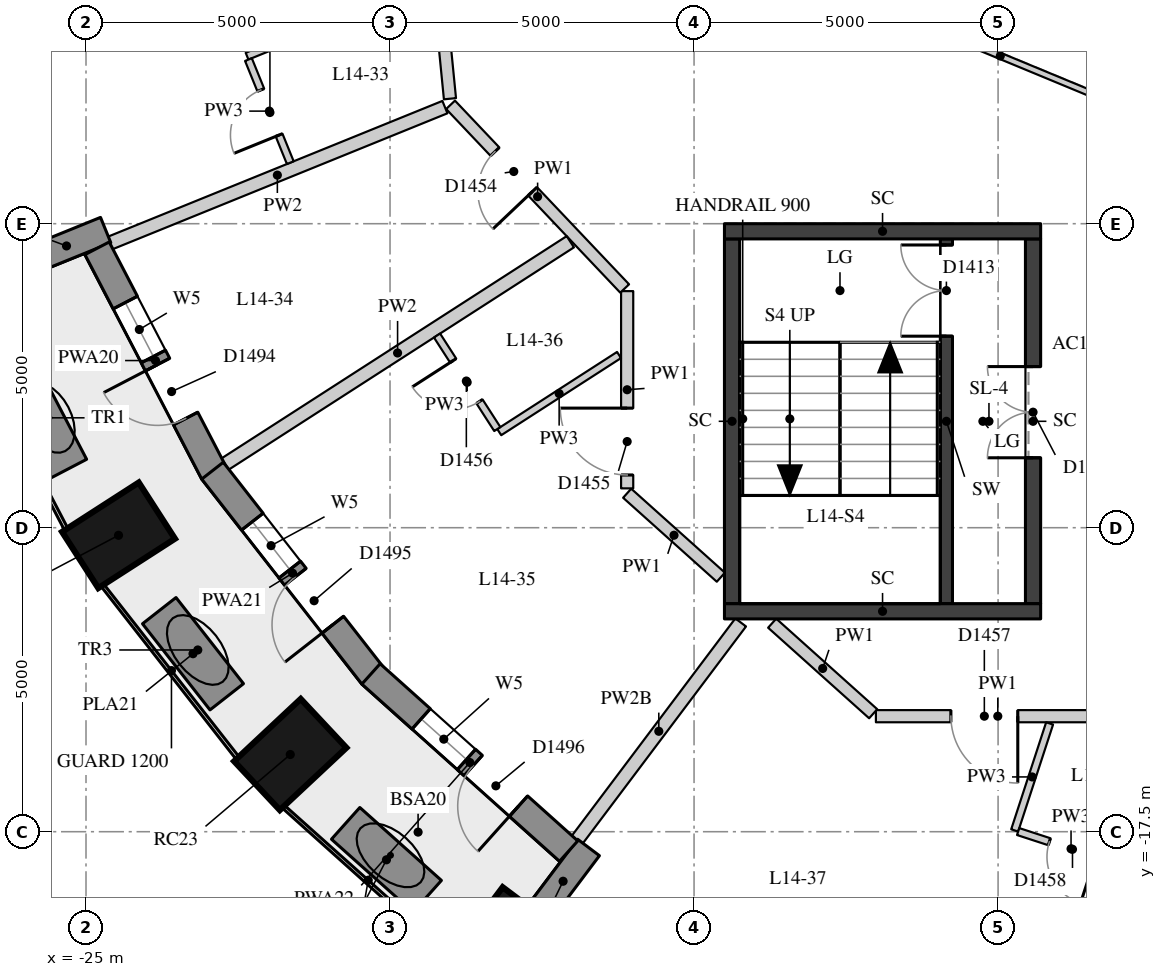
"""IFC4 building model, lengths in metres.
Left out: names, types, materials, properties, quantities, classifications, styles, units other than length and angle.
Written with IfcOpenShell. Run it as: python <this file> out.ifc"""

import sys

from ifc_helpers import new_model, si_unit, direction, frame, frame_2d, origin, origin_2d, place, context, subcontext, project, spatial, rectangle, extrude, element, fill, save


model = new_model("IFC4")
c1 = context("Model", 3, precision=1e-05, world=origin(), true_north=direction((0.0, 1.0)))
c2 = subcontext(c1, "Body", "Model", "MODEL_VIEW")
j1 = project(units=[si_unit("LENGTHUNIT", "METRE"), si_unit("PLANEANGLEUNIT", "RADIAN")], contexts=[c1])
p1 = place(None, origin())
s1 = spatial("IfcSite", under=j1, at=p1, CompositionType="ELEMENT")
p2 = place(p1, origin())
s2 = spatial("IfcBuilding", under=s1, at=p2, CompositionType="ELEMENT")
p3 = place(p2, frame((0.0, 0.0, 54.7)))
s3 = spatial("IfcBuildingStorey", under=s2, at=p3, CompositionType="ELEMENT", Elevation=54.7)
for number, where, z_axis, x_axis in (
    (1, (-24.465, -12.625, 0.0), (0.0, 0.0, 1.0), (-0.841, -0.541, 0.0)),
    (2, (-21.641, -16.23, 0.0), (0.0, 0.0, 1.0), (-0.73, -0.683, 0.0)),
    (3, (-18.159, -19.343, 0.0), (0.0, 0.0, 1.0), (-0.601, -0.799, 0.0)),
):
    element("IfcColumn", number, at=place(p3, frame(where, z_axis=z_axis, x_axis=x_axis)), inside=s3, PredefinedType="COLUMN", context=c2, shape_type="SweptSolid", body=[
        extrude(rectangle(XDim=1.5, YDim=1.1, at=origin_2d()), origin(), (0.0, 0.0, 1.0), 3.3),
    ])
p4 = place(p3, frame((-25.965, -8.127, 0.0), z_axis=(0.0, 0.0, 1.0), x_axis=(0.926575599743, 0.376108572039, 0.0)))
e4 = element("IfcWall", 4, at=p4, inside=s3, PredefinedType="SOLIDWALL", context=c2, shape_type="SweptSolid", body=[
    extrude(rectangle(XDim=1.39, YDim=0.45, at=frame_2d((0.695, 0.0))), origin(), (0.0, 0.0, 1.0), 3.02),
])
p5 = place(p3, frame((-17.572, -18.871, 0.0), z_axis=(0.0, 0.0, 1.0), x_axis=(0.601262851241, 0.799051302306, 0.0)))
e5 = element("IfcWall", 5, at=p5, inside=s3, PredefinedType="SOLIDWALL", context=c2, shape_type="SweptSolid", body=[
    extrude(rectangle(XDim=1.391, YDim=0.45, at=frame_2d((0.696, 0.0))), origin(), (0.0, 0.0, 1.0), 2.57),
])
p6 = place(p3, frame((-24.818, -7.905, 0.0), z_axis=(0.0, 0.0, 1.0), x_axis=(0.461517123562, -0.887131300687, 0.0)))
e6 = element("IfcWall", 6, at=p6, inside=s3, PredefinedType="SOLIDWALL", context=c2, shape_type="SweptSolid", body=[
    extrude(rectangle(XDim=4.162, YDim=0.45, at=frame_2d((2.081, 0.0))), origin(), (0.0, 0.0, 1.0), 3.02),
])
p7 = place(p6, frame((1.006, 0.0, 0.4)))
e7 = element("IfcOpeningElement", 7, at=p7, cuts=e6, PredefinedType="OPENING", context=c2, shape_type="SweptSolid", body=[
    extrude(rectangle(XDim=1.0, YDim=1.75, at=frame_2d((0.5, 0.875))), frame((0.0, 0.235, 0.0), z_axis=(0.0, -1.0, 0.0), x_axis=(1.0, 0.0, 0.0)), (0.0, 0.0, 1.0), 0.47),
])
p8 = place(p6, frame((2.156, 0.0, 0.0)))
e8 = element("IfcOpeningElement", 8, at=p8, cuts=e6, PredefinedType="OPENING", context=c2, shape_type="SweptSolid", body=[
    extrude(rectangle(XDim=1.0, YDim=2.15, at=frame_2d((0.5, 1.075))), frame((0.0, 0.235, 0.0), z_axis=(0.0, -1.0, 0.0), x_axis=(1.0, 0.0, 0.0)), (0.0, 0.0, 1.0), 0.47),
])
p9 = place(p3, frame((-22.92, -11.562, 0.0), z_axis=(0.0, 0.0, 1.0), x_axis=(0.615586464456, -0.788069352772, 0.0)))
e9 = element("IfcWall", 9, at=p9, inside=s3, PredefinedType="SOLIDWALL", context=c2, shape_type="SweptSolid", body=[
    extrude(rectangle(XDim=4.279, YDim=0.45, at=frame_2d((2.139, 0.0))), origin(), (0.0, 0.0, 1.0), 3.02),
])
p10 = place(p9, frame((1.064, 0.0, 0.4)))
e10 = element("IfcOpeningElement", 10, at=p10, cuts=e9, PredefinedType="OPENING", context=c2, shape_type="SweptSolid", body=[
    extrude(rectangle(XDim=1.0, YDim=1.75, at=frame_2d((0.5, 0.875))), frame((0.0, 0.235, 0.0), z_axis=(0.0, -1.0, 0.0), x_axis=(1.0, 0.0, 0.0)), (0.0, 0.0, 1.0), 0.47),
])
p11 = place(p9, frame((2.214, 0.0, 0.0)))
e11 = element("IfcOpeningElement", 11, at=p11, cuts=e9, PredefinedType="OPENING", context=c2, shape_type="SweptSolid", body=[
    extrude(rectangle(XDim=1.0, YDim=2.15, at=frame_2d((0.5, 1.075))), frame((0.0, 0.235, 0.0), z_axis=(0.0, -1.0, 0.0), x_axis=(1.0, 0.0, 0.0)), (0.0, 0.0, 1.0), 0.47),
])
p12 = place(p3, frame((-20.313, -14.905, 0.0), z_axis=(0.0, 0.0, 1.0), x_axis=(0.744616407434, -0.667492626012, 0.0)))
e12 = element("IfcWall", 12, at=p12, inside=s3, PredefinedType="SOLIDWALL", context=c2, shape_type="SweptSolid", body=[
    extrude(rectangle(XDim=4.365, YDim=0.45, at=frame_2d((2.183, 0.0))), origin(), (0.0, 0.0, 1.0), 3.02),
])
p13 = place(p12, frame((1.108, 0.0, 0.4)))
e13 = element("IfcOpeningElement", 13, at=p13, cuts=e12, PredefinedType="OPENING", context=c2, shape_type="SweptSolid", body=[
    extrude(rectangle(XDim=1.0, YDim=1.75, at=frame_2d((0.5, 0.875))), frame((0.0, 0.235, 0.0), z_axis=(0.0, -1.0, 0.0), x_axis=(1.0, 0.0, 0.0)), (0.0, 0.0, 1.0), 0.47),
])
p14 = place(p12, frame((2.258, 0.0, 0.0)))
e14 = element("IfcOpeningElement", 14, at=p14, cuts=e12, PredefinedType="OPENING", context=c2, shape_type="SweptSolid", body=[
    extrude(rectangle(XDim=1.0, YDim=2.15, at=frame_2d((0.5, 1.075))), frame((0.0, 0.235, 0.0), z_axis=(0.0, -1.0, 0.0), x_axis=(1.0, 0.0, 0.0)), (0.0, 0.0, 1.0), 0.47),
])
p15 = place(p3, frame((-26.133, -9.941, 0.0), z_axis=(0.0, 0.0, 1.0), x_axis=(0.462501112253, -0.886618701114, 0.0)))
e15 = element("IfcWall", 15, at=p15, inside=s3, PredefinedType="USERDEFINED", context=c2, shape_type="SweptSolid", body=[
    extrude(rectangle(XDim=1.8, YDim=0.7, at=frame_2d((0.9, 0.0))), origin(), (0.0, 0.0, 1.0), 0.75),
])
p16 = place(p3, frame((-23.795, -13.864, 0.0), z_axis=(0.0, 0.0, 1.0), x_axis=(0.616622746332, -0.787258781282, 0.0)))
e16 = element("IfcWall", 16, at=p16, inside=s3, PredefinedType="USERDEFINED", context=c2, shape_type="SweptSolid", body=[
    extrude(rectangle(XDim=1.8, YDim=0.7, at=frame_2d((0.9, 0.0))), origin(), (0.0, 0.0, 1.0), 0.75),
])
p17 = place(p3, frame((-20.73, -17.363, 0.0), z_axis=(0.0, 0.0, 1.0), x_axis=(0.745535653445, -0.666465745139, 0.0)))
e17 = element("IfcWall", 17, at=p17, inside=s3, PredefinedType="USERDEFINED", context=c2, shape_type="SweptSolid", body=[
    extrude(rectangle(XDim=1.8, YDim=0.7, at=frame_2d((0.9, 0.0))), origin(), (0.0, 0.0, 1.0), 0.75),
])
p18 = place(p3, frame((-10.85, -13.75, 0.0), z_axis=(0.0, 0.0, 1.0), x_axis=(0.0, 1.0, 0.0)))
e18 = element("IfcWall", 18, at=p18, inside=s3, PredefinedType="SHEAR", context=c2, shape_type="SweptSolid", body=[
    extrude(rectangle(XDim=6.0, YDim=0.2, at=frame_2d((3.0, 0.0))), origin(), (0.0, 0.0, 1.0), 3.02),
])
p19 = place(p18, frame((4.4, 0.0, 0.0)))
e19 = element("IfcOpeningElement", 19, at=p19, cuts=e18, PredefinedType="OPENING", context=c2, shape_type="SweptSolid", body=[
    extrude(rectangle(XDim=1.5, YDim=2.1, at=frame_2d((0.75, 1.05))), frame((0.0, 0.11, 0.0), z_axis=(0.0, -1.0, 0.0), x_axis=(1.0, 0.0, 0.0)), (0.0, 0.0, 1.0), 0.22),
])
p20 = place(p3, frame((-14.375, -13.75, -0.28), z_axis=(0.0, 0.0, 1.0), x_axis=(0.0, 1.0, 0.0)))
e20 = element("IfcWall", 20, at=p20, inside=s3, PredefinedType="SHEAR", context=c2, shape_type="SweptSolid", body=[
    extrude(rectangle(XDim=6.0, YDim=0.25, at=frame_2d((3.0, 0.0))), origin(), (0.0, 0.0, 1.0), 3.3),
])
p21 = place(p3, frame((-9.425, -13.75, -0.28), z_axis=(0.0, 0.0, 1.0), x_axis=(0.0, 1.0, 0.0)))
e21 = element("IfcWall", 21, at=p21, inside=s3, PredefinedType="SHEAR", context=c2, shape_type="SweptSolid", body=[
    extrude(rectangle(XDim=6.0, YDim=0.25, at=frame_2d((3.0, 0.0))), origin(), (0.0, 0.0, 1.0), 3.3),
])
p22 = place(p21, frame((2.4, 0.0, 0.28)))
e22 = element("IfcOpeningElement", 22, at=p22, cuts=e21, PredefinedType="OPENING", context=c2, shape_type="SweptSolid", body=[
    extrude(rectangle(XDim=1.5, YDim=2.1, at=frame_2d((0.75, 1.05))), frame((0.0, 0.135, 0.0), z_axis=(0.0, -1.0, 0.0), x_axis=(1.0, 0.0, 0.0)), (0.0, 0.0, 1.0), 0.27),
])
for number, where, z_axis, x_axis in (
    (23, (-14.5, -7.625, -0.28), (0.0, 0.0, 1.0), (1.0, 0.0, 0.0)),
    (24, (-14.5, -13.875, -0.28), (0.0, 0.0, 1.0), (1.0, 0.0, 0.0)),
):
    element("IfcWall", number, at=place(p3, frame(where, z_axis=z_axis, x_axis=x_axis)), inside=s3, PredefinedType="SHEAR", context=c2, shape_type="SweptSolid", body=[
        extrude(rectangle(XDim=5.2, YDim=0.25, at=frame_2d((2.6, 0.0))), origin(), (0.0, 0.0, 1.0), 3.3),
    ])
p23 = place(p3, frame((-14.559, -13.314, 0.0), z_axis=(0.0, 0.0, 1.0), x_axis=(-0.744636171002, 0.667470578254, 0.0)))
e25 = element("IfcWall", 25, at=p23, inside=s3, PredefinedType="PARTITIONING", context=c2, shape_type="SweptSolid", body=[
    extrude(rectangle(XDim=2.069, YDim=0.2, at=frame_2d((1.035, 0.0))), origin(), (0.0, 0.0, 1.0), 3.02),
])
p24 = place(p3, frame((-16.1, -11.853, 0.0), z_axis=(0.0, 0.0, 1.0), x_axis=(0.0, 1.0, 0.0)))
e26 = element("IfcWall", 26, at=p24, inside=s3, PredefinedType="PARTITIONING", context=c2, shape_type="SweptSolid", body=[
    extrude(rectangle(XDim=3.244, YDim=0.2, at=frame_2d((1.622, 0.0))), origin(), (0.0, 0.0, 1.0), 3.02),
])
p25 = place(p24, frame((0.22, 0.0, 0.0)))
e27 = element("IfcOpeningElement", 27, at=p25, cuts=e26, PredefinedType="OPENING", context=c2, shape_type="SweptSolid", body=[
    extrude(rectangle(XDim=1.1, YDim=2.1, at=frame_2d((0.55, 1.05))), frame((0.0, 0.11, 0.0), z_axis=(0.0, -1.0, 0.0), x_axis=(1.0, 0.0, 0.0)), (0.0, 0.0, 1.0), 0.22),
])
p26 = place(p3, frame((-16.141, -8.566, 0.0), z_axis=(0.0, 0.0, 1.0), x_axis=(-0.687938220375, 0.725769250483, 0.0)))
e28 = element("IfcWall", 28, at=p26, inside=s3, PredefinedType="PARTITIONING", context=c2, shape_type="SweptSolid", body=[
    extrude(rectangle(XDim=4.162, YDim=0.2, at=frame_2d((2.081, 0.0))), origin(), (0.0, 0.0, 1.0), 3.02),
])
p27 = place(p26, frame((2.201, 0.0, 0.0)))
e29 = element("IfcOpeningElement", 29, at=p27, cuts=e28, PredefinedType="OPENING", context=c2, shape_type="SweptSolid", body=[
    extrude(rectangle(XDim=0.9, YDim=2.1, at=frame_2d((0.45, 1.05))), frame((0.0, 0.11, 0.0), z_axis=(0.0, -1.0, 0.0), x_axis=(1.0, 0.0, 0.0)), (0.0, 0.0, 1.0), 0.22),
])
p28 = place(p3, frame((-19.014, -5.445, 0.0), z_axis=(0.0, 0.0, 1.0), x_axis=(-0.098076369896, 0.995178891289, 0.0)))
e30 = element("IfcWall", 30, at=p28, inside=s3, PredefinedType="PARTITIONING", context=c2, shape_type="SweptSolid", body=[
    extrude(rectangle(XDim=8.282, YDim=0.2, at=frame_2d((4.141, 0.0))), origin(), (0.0, 0.0, 1.0), 3.02),
])
p29 = place(p28, frame((2.142, 0.0, 0.0)))
e31 = element("IfcOpeningElement", 31, at=p29, cuts=e30, PredefinedType="OPENING", context=c2, shape_type="SweptSolid", body=[
    extrude(rectangle(XDim=1.1, YDim=2.1, at=frame_2d((0.55, 1.05))), frame((0.0, 0.11, 0.0), z_axis=(0.0, -1.0, 0.0), x_axis=(1.0, 0.0, 0.0)), (0.0, 0.0, 1.0), 0.22),
])
p30 = place(p3, frame((-8.0, -15.6, 0.0), z_axis=(0.0, 0.0, 1.0), x_axis=(-1.0, 0.0, 0.0)))
e32 = element("IfcWall", 32, at=p30, inside=s3, PredefinedType="PARTITIONING", context=c2, shape_type="SweptSolid", body=[
    extrude(rectangle(XDim=4.009, YDim=0.2, at=frame_2d((2.005, 0.0))), origin(), (0.0, 0.0, 1.0), 3.02),
])
p31 = place(p30, frame((1.676, 0.0, 0.0)))
e33 = element("IfcOpeningElement", 33, at=p31, cuts=e32, PredefinedType="OPENING", context=c2, shape_type="SweptSolid", body=[
    extrude(rectangle(XDim=1.1, YDim=2.1, at=frame_2d((0.55, 1.05))), frame((0.0, 0.11, 0.0), z_axis=(0.0, -1.0, 0.0), x_axis=(1.0, 0.0, 0.0)), (0.0, 0.0, 1.0), 0.22),
])
p32 = place(p3, frame((-12.054, -15.56, 0.0), z_axis=(0.0, 0.0, 1.0), x_axis=(-0.744625700487, 0.66748225907, 0.0)))
e34 = element("IfcWall", 34, at=p32, inside=s3, PredefinedType="PARTITIONING", context=c2, shape_type="SweptSolid", body=[
    extrude(rectangle(XDim=2.231, YDim=0.2, at=frame_2d((1.116, 0.0))), origin(), (0.0, 0.0, 1.0), 3.02),
])
p33 = place(p3, frame((-24.609, -7.82, 0.0), z_axis=(0.0, 0.0, 1.0), x_axis=(0.926562262773, 0.376141427131, 0.0)))
e35 = element("IfcWall", 35, at=p33, inside=s3, PredefinedType="PARTITIONING", context=c2, shape_type="SweptSolid", body=[
    extrude(rectangle(XDim=5.948, YDim=0.22, at=frame_2d((2.974, 0.0))), origin(), (0.0, 0.0, 1.0), 3.02),
])
p34 = place(p3, frame((-22.717, -11.456, 0.0), z_axis=(0.0, 0.0, 1.0), x_axis=(0.840775666807, 0.541383669965, 0.0)))
e36 = element("IfcWall", 36, at=p34, inside=s3, PredefinedType="PARTITIONING", context=c2, shape_type="SweptSolid", body=[
    extrude(rectangle(XDim=6.759, YDim=0.22, at=frame_2d((3.379, 0.0))), origin(), (0.0, 0.0, 1.0), 3.02),
])
p35 = place(p3, frame((-16.927, -17.638, 0.0), z_axis=(0.0, 0.0, 1.0), x_axis=(0.601158965663, 0.799129462605, 0.0)))
e37 = element("IfcWall", 37, at=p35, inside=s3, PredefinedType="PARTITIONING", context=c2, shape_type="SweptSolid", body=[
    extrude(rectangle(XDim=4.48, YDim=0.22, at=frame_2d((2.24, 0.0))), origin(), (0.0, 0.0, 1.0), 2.57),
])
p36 = place(p3, frame((-9.429, -23.014, 0.0), z_axis=(0.0, 0.0, 1.0), x_axis=(0.310249775859, 0.950655077607, 0.0)))
e38 = element("IfcWall", 38, at=p36, inside=s3, PredefinedType="PARTITIONING", context=c2, shape_type="SweptSolid", body=[
    extrude(rectangle(XDim=7.85, YDim=0.22, at=frame_2d((3.925, 0.0))), origin(), (0.0, 0.0, 1.0), 3.02),
])
p37 = place(p3, frame((-19.324, -3.516, 0.0), z_axis=(0.0, 0.0, 1.0), x_axis=(-0.926573216048, -0.376114444421, 0.0)))
e39 = element("IfcWall", 39, at=p37, inside=s3, PredefinedType="PARTITIONING", context=c2, shape_type="SweptSolid", body=[
    extrude(rectangle(XDim=3.267, YDim=0.12, at=frame_2d((1.634, 0.0))), origin(), (0.0, 0.0, 1.0), 3.02),
])
p38 = place(p3, frame((-16.234, -9.66, 0.0), z_axis=(0.0, 0.0, 1.0), x_axis=(-0.840731269954, -0.541452612628, 0.0)))
e40 = element("IfcWall", 40, at=p38, inside=s3, PredefinedType="PARTITIONING", context=c2, shape_type="SweptSolid", body=[
    extrude(rectangle(XDim=2.343, YDim=0.12, at=frame_2d((1.171, 0.0))), origin(), (0.0, 0.0, 1.0), 3.02),
])
p39 = place(p3, frame((-9.153, -15.719, 0.0), z_axis=(0.0, 0.0, 1.0), x_axis=(-0.310326382186, -0.950630073435, 0.0)))
e41 = element("IfcWall", 41, at=p39, inside=s3, PredefinedType="PARTITIONING", context=c2, shape_type="SweptSolid", body=[
    extrude(rectangle(XDim=1.851, YDim=0.12, at=frame_2d((0.926, 0.0))), origin(), (0.0, 0.0, 1.0), 3.02),
])
p40 = place(p3, frame((-22.329, -4.801, 0.0), z_axis=(0.0, 0.0, 1.0), x_axis=(0.376101474088, -0.926578480858, 0.0)))
e42 = element("IfcWall", 42, at=p40, inside=s3, PredefinedType="PARTITIONING", context=c2, shape_type="SweptSolid", body=[
    extrude(rectangle(XDim=1.83, YDim=0.12, at=frame_2d((0.915, 0.0))), origin(), (0.0, 0.0, 1.0), 3.02),
])
p41 = place(p40, frame((0.54, 0.0, 0.0)))
e43 = element("IfcOpeningElement", 43, at=p41, cuts=e42, PredefinedType="OPENING", context=c2, shape_type="SweptSolid", body=[
    extrude(rectangle(XDim=0.8, YDim=2.1, at=frame_2d((0.4, 1.05))), frame((0.0, 0.07, 0.0), z_axis=(0.0, -1.0, 0.0), x_axis=(1.0, 0.0, 0.0)), (0.0, 0.0, 1.0), 0.14),
])
p42 = place(p3, frame((-18.236, -10.878, 0.0), z_axis=(0.0, 0.0, 1.0), x_axis=(-0.54164058606, 0.840610180484, 0.0)))
e44 = element("IfcWall", 44, at=p42, inside=s3, PredefinedType="PARTITIONING", context=c2, shape_type="SweptSolid", body=[
    extrude(rectangle(XDim=1.83, YDim=0.12, at=frame_2d((0.915, 0.0))), origin(), (0.0, 0.0, 1.0), 3.02),
])
p43 = place(p42, frame((0.54, 0.0, 0.0)))
e45 = element("IfcOpeningElement", 45, at=p43, cuts=e44, PredefinedType="OPENING", context=c2, shape_type="SweptSolid", body=[
    extrude(rectangle(XDim=0.8, YDim=2.1, at=frame_2d((0.4, 1.05))), frame((0.0, 0.07, 0.0), z_axis=(0.0, -1.0, 0.0), x_axis=(1.0, 0.0, 0.0)), (0.0, 0.0, 1.0), 0.14),
])
p44 = place(p3, frame((-9.67, -17.498, 0.0), z_axis=(0.0, 0.0, 1.0), x_axis=(0.950678536911, -0.31017788357, 0.0)))
e46 = element("IfcWall", 46, at=p44, inside=s3, PredefinedType="PARTITIONING", context=c2, shape_type="SweptSolid", body=[
    extrude(rectangle(XDim=1.83, YDim=0.12, at=frame_2d((0.915, 0.0))), origin(), (0.0, 0.0, 1.0), 3.02),
])
p45 = place(p44, frame((0.54, 0.0, 0.0)))
e47 = element("IfcOpeningElement", 47, at=p45, cuts=e46, PredefinedType="OPENING", context=c2, shape_type="SweptSolid", body=[
    extrude(rectangle(XDim=0.8, YDim=2.1, at=frame_2d((0.4, 1.05))), frame((0.0, 0.07, 0.0), z_axis=(0.0, -1.0, 0.0), x_axis=(1.0, 0.0, 0.0)), (0.0, 0.0, 1.0), 0.14),
])
p46 = place(p3, frame((-8.0, -5.554, 0.0), z_axis=(0.0, 0.0, 1.0), x_axis=(-0.923860025149, 0.382730523909, 0.0)))
e48 = element("IfcWall", 48, at=p46, inside=s3, PredefinedType="PARTITIONING", context=c2, shape_type="SweptSolid", body=[
    extrude(rectangle(XDim=4.251, YDim=0.1, at=frame_2d((2.125, 0.0))), origin(), (0.0, 0.0, 1.0), 3.02),
])
p47 = place(p7, origin())
e49 = element("IfcWindow", 49, at=p47, inside=s3, PartitioningType="SINGLE_PANEL", PredefinedType="WINDOW", context=c2, shape_type="SweptSolid", body=[
    extrude(rectangle(XDim=1.0, YDim=1.75, at=frame_2d((0.5, 0.875))), frame((0.0, 0.035, 0.0), z_axis=(0.0, -1.0, 0.0), x_axis=(1.0, 0.0, 0.0)), (0.0, 0.0, 1.0), 0.06),
])
fill(e7, e49)
p48 = place(p8, frame((1.0, 0.0, 0.0), z_axis=(0.0, 0.0, 1.0), x_axis=(-1.0, 0.0, 0.0)))
e50 = element("IfcDoor", 50, at=p48, inside=s3, OperationType="SINGLE_SWING_RIGHT", PredefinedType="DOOR", context=c2, shape_type="SweptSolid", body=[
    extrude(rectangle(XDim=1.0, YDim=2.15, at=frame_2d((0.5, 1.075))), frame((0.0, 0.075, 0.0), z_axis=(0.0, -1.0, 0.0), x_axis=(1.0, 0.0, 0.0)), (0.0, 0.0, 1.0), 0.05),
])
fill(e8, e50)
p49 = place(p10, origin())
e51 = element("IfcWindow", 51, at=p49, inside=s3, PartitioningType="SINGLE_PANEL", PredefinedType="WINDOW", context=c2, shape_type="SweptSolid", body=[
    extrude(rectangle(XDim=1.0, YDim=1.75, at=frame_2d((0.5, 0.875))), frame((0.0, 0.035, 0.0), z_axis=(0.0, -1.0, 0.0), x_axis=(1.0, 0.0, 0.0)), (0.0, 0.0, 1.0), 0.06),
])
fill(e10, e51)
p50 = place(p11, frame((1.0, 0.0, 0.0), z_axis=(0.0, 0.0, 1.0), x_axis=(-1.0, 0.0, 0.0)))
e52 = element("IfcDoor", 52, at=p50, inside=s3, OperationType="SINGLE_SWING_LEFT", PredefinedType="DOOR", context=c2, shape_type="SweptSolid", body=[
    extrude(rectangle(XDim=1.0, YDim=2.15, at=frame_2d((0.5, 1.075))), frame((0.0, 0.075, 0.0), z_axis=(0.0, -1.0, 0.0), x_axis=(1.0, 0.0, 0.0)), (0.0, 0.0, 1.0), 0.05),
])
fill(e11, e52)
p51 = place(p13, origin())
e53 = element("IfcWindow", 53, at=p51, inside=s3, PartitioningType="SINGLE_PANEL", PredefinedType="WINDOW", context=c2, shape_type="SweptSolid", body=[
    extrude(rectangle(XDim=1.0, YDim=1.75, at=frame_2d((0.5, 0.875))), frame((0.0, 0.035, 0.0), z_axis=(0.0, -1.0, 0.0), x_axis=(1.0, 0.0, 0.0)), (0.0, 0.0, 1.0), 0.06),
])
fill(e13, e53)
p52 = place(p14, frame((1.0, 0.0, 0.0), z_axis=(0.0, 0.0, 1.0), x_axis=(-1.0, 0.0, 0.0)))
e54 = element("IfcDoor", 54, at=p52, inside=s3, OperationType="SINGLE_SWING_LEFT", PredefinedType="DOOR", context=c2, shape_type="SweptSolid", body=[
    extrude(rectangle(XDim=1.0, YDim=2.15, at=frame_2d((0.5, 1.075))), frame((0.0, 0.075, 0.0), z_axis=(0.0, -1.0, 0.0), x_axis=(1.0, 0.0, 0.0)), (0.0, 0.0, 1.0), 0.05),
])
fill(e14, e54)
p53 = place(p19, origin())
e55 = element("IfcDoor", 55, at=p53, inside=s3, OperationType="DOUBLE_DOOR_SINGLE_SWING", PredefinedType="DOOR", context=c2, shape_type="SweptSolid", body=[
    extrude(rectangle(XDim=1.5, YDim=2.1, at=frame_2d((0.75, 1.05))), frame((0.0, 0.025, 0.0), z_axis=(0.0, -1.0, 0.0), x_axis=(1.0, 0.0, 0.0)), (0.0, 0.0, 1.0), 0.05),
])
fill(e19, e55)
p54 = place(p22, origin())
e56 = element("IfcDoor", 56, at=p54, inside=s3, OperationType="DOUBLE_DOOR_SINGLE_SWING", PredefinedType="DOOR", context=c2, shape_type="SweptSolid", body=[
    extrude(rectangle(XDim=1.5, YDim=2.1, at=frame_2d((0.75, 1.05))), frame((0.0, 0.025, 0.0), z_axis=(0.0, -1.0, 0.0), x_axis=(1.0, 0.0, 0.0)), (0.0, 0.0, 1.0), 0.05),
])
fill(e22, e56)
p55 = place(p41, origin())
e57 = element("IfcDoor", 57, at=p55, inside=s3, OperationType="SINGLE_SWING_LEFT", PredefinedType="DOOR", context=c2, shape_type="SweptSolid", body=[
    extrude(rectangle(XDim=0.8, YDim=2.1, at=frame_2d((0.4, 1.05))), frame((0.0, 0.025, 0.0), z_axis=(0.0, -1.0, 0.0), x_axis=(1.0, 0.0, 0.0)), (0.0, 0.0, 1.0), 0.05),
])
fill(e43, e57)
p56 = place(p27, origin())
e58 = element("IfcDoor", 58, at=p56, inside=s3, OperationType="SINGLE_SWING_LEFT", PredefinedType="DOOR", context=c2, shape_type="SweptSolid", body=[
    extrude(rectangle(XDim=0.9, YDim=2.1, at=frame_2d((0.45, 1.05))), frame((0.0, 0.025, 0.0), z_axis=(0.0, -1.0, 0.0), x_axis=(1.0, 0.0, 0.0)), (0.0, 0.0, 1.0), 0.05),
])
fill(e29, e58)
p57 = place(p25, origin())
e59 = element("IfcDoor", 59, at=p57, inside=s3, OperationType="SINGLE_SWING_RIGHT", PredefinedType="DOOR", context=c2, shape_type="SweptSolid", body=[
    extrude(rectangle(XDim=1.1, YDim=2.1, at=frame_2d((0.55, 1.05))), frame((0.0, 0.025, 0.0), z_axis=(0.0, -1.0, 0.0), x_axis=(1.0, 0.0, 0.0)), (0.0, 0.0, 1.0), 0.05),
])
fill(e27, e59)
p58 = place(p43, origin())
e60 = element("IfcDoor", 60, at=p58, inside=s3, OperationType="SINGLE_SWING_RIGHT", PredefinedType="DOOR", context=c2, shape_type="SweptSolid", body=[
    extrude(rectangle(XDim=0.8, YDim=2.1, at=frame_2d((0.4, 1.05))), frame((0.0, 0.025, 0.0), z_axis=(0.0, -1.0, 0.0), x_axis=(1.0, 0.0, 0.0)), (0.0, 0.0, 1.0), 0.05),
])
fill(e45, e60)
p59 = place(p31, origin())
e61 = element("IfcDoor", 61, at=p59, inside=s3, OperationType="SINGLE_SWING_LEFT", PredefinedType="DOOR", context=c2, shape_type="SweptSolid", body=[
    extrude(rectangle(XDim=1.1, YDim=2.1, at=frame_2d((0.55, 1.05))), frame((0.0, 0.025, 0.0), z_axis=(0.0, -1.0, 0.0), x_axis=(1.0, 0.0, 0.0)), (0.0, 0.0, 1.0), 0.05),
])
fill(e33, e61)
p60 = place(p45, origin())
e62 = element("IfcDoor", 62, at=p60, inside=s3, OperationType="SINGLE_SWING_LEFT", PredefinedType="DOOR", context=c2, shape_type="SweptSolid", body=[
    extrude(rectangle(XDim=0.8, YDim=2.1, at=frame_2d((0.4, 1.05))), frame((0.0, 0.025, 0.0), z_axis=(0.0, -1.0, 0.0), x_axis=(1.0, 0.0, 0.0)), (0.0, 0.0, 1.0), 0.05),
])
fill(e47, e62)
save(model, sys.argv[1])
